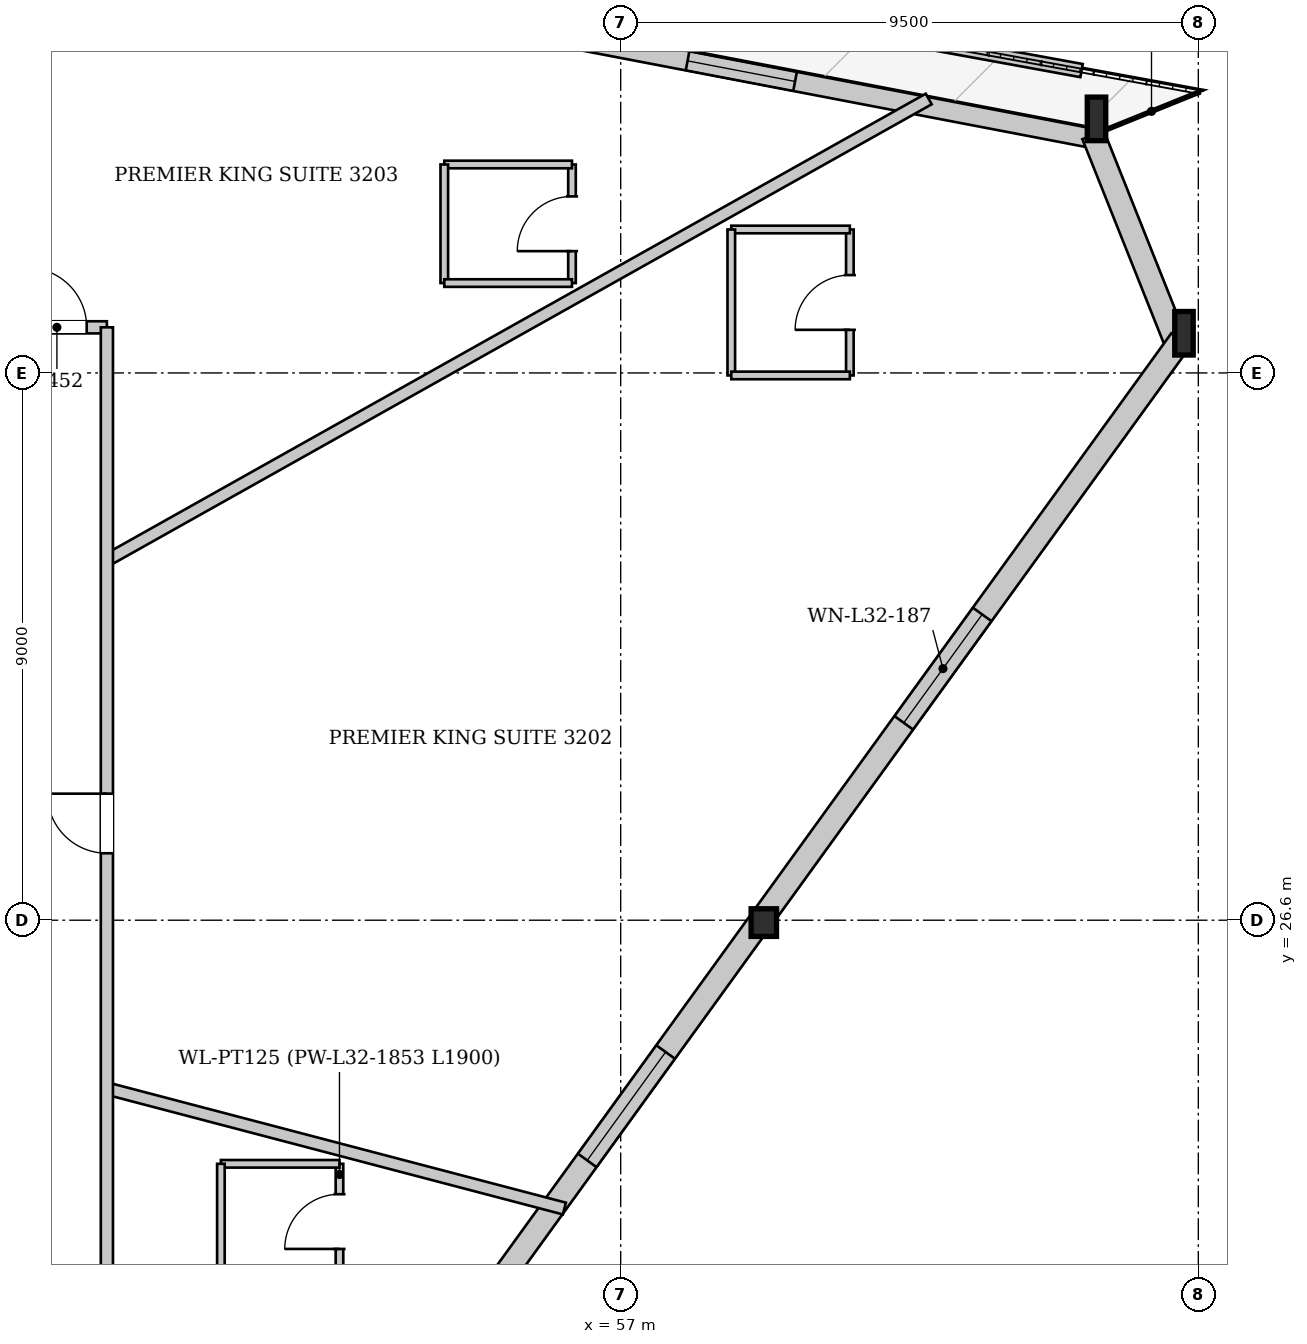
"""IFC4 building model, lengths in metres.
Left out: names, types, materials, properties, quantities, classifications, styles, units other than length and angle.
Written with IfcOpenShell. Run it as: python <this file> out.ifc"""

import sys

from ifc_helpers import new_model, si_unit, direction, frame, frame_2d, origin, origin_2d, place, context, subcontext, project, spatial, rectangle, i_section, extrude, source, transform, mapped, element, fill, save


model = new_model("IFC4")
c1 = context("Model", 3, precision=1e-05, world=origin(), true_north=direction((0.0, 1.0)))
c2 = subcontext(c1, "Body", "Model", "MODEL_VIEW")
j1 = project(units=[si_unit("LENGTHUNIT", "METRE"), si_unit("PLANEANGLEUNIT", "RADIAN")], contexts=[c1])
p1 = place(None, origin())
s1 = spatial("IfcSite", under=j1, at=p1, CompositionType="ELEMENT")
p2 = place(p1, origin())
s2 = spatial("IfcBuilding", under=s1, at=p2, CompositionType="ELEMENT")
p3 = place(p2, frame((0.0, 0.0, 123.45)))
s3 = spatial("IfcBuildingStorey", under=s2, at=p3, CompositionType="ELEMENT", Elevation=123.45)
m1 = source(origin(), c2, "Body", "SweptSolid", [
    extrude(i_section(OverallWidth=0.304, OverallDepth=0.716, WebThickness=0.021, FlangeThickness=0.04, at=origin_2d()), origin(), (0.0, 0.0, 1.0), 3.42),
])
p4 = place(p3, frame((66.364, 36.03, 0.0), z_axis=(-0.058395844812, 0.129927185279, 0.989802430707), x_axis=(-0.912108953762, -0.409947870427, 0.0)))
e1 = element("IfcColumn", 1, at=p4, inside=s3, PredefinedType="COLUMN", context=c2, shape_type="MappedRepresentation", body=[
    mapped(m1, transform((0.0, 0.0, 0.0), x_axis=(1.0, 0.0, 0.0), y_axis=(0.0, 1.0, 0.0), z_axis=(0.0, 0.0, 1.0), scale=1.0)),
])
m2 = source(origin(), c2, "Body", "SweptSolid", [
    extrude(i_section(OverallWidth=0.304, OverallDepth=0.716, WebThickness=0.021, FlangeThickness=0.04, at=origin_2d()), origin(), (0.0, 0.0, 1.0), 3.416),
])
p5 = place(p3, frame((64.946, 39.585, 0.0), z_axis=(-0.07047959591, 0.113153347186, 0.991074642285), x_axis=(-0.848810648346, -0.528696967321, 0.0)))
e2 = element("IfcColumn", 2, at=p5, inside=s3, PredefinedType="COLUMN", context=c2, shape_type="MappedRepresentation", body=[
    mapped(m2, transform((0.0, 0.0, 0.0), x_axis=(1.0, 0.0, 0.0), y_axis=(0.0, 1.0, 0.0), z_axis=(0.0, 0.0, 1.0), scale=1.0)),
])
m3 = source(origin(), c2, "Body", "SweptSolid", [
    extrude(i_section(OverallWidth=0.418, OverallDepth=0.455, WebThickness=0.038, FlangeThickness=0.059, at=origin_2d()), origin(), (0.0, 0.0, 1.0), 3.405),
])
p6 = place(p3, frame((59.382, 26.38, 0.0), z_axis=(-0.01663532253, 0.106480404985, 0.994175633074), x_axis=(-0.988015204801, -0.154356584184, 0.0)))
e3 = element("IfcColumn", 3, at=p6, inside=s3, PredefinedType="COLUMN", context=c2, shape_type="MappedRepresentation", body=[
    mapped(m3, transform((0.0, 0.0, 0.0), x_axis=(1.0, 0.0, 0.0), y_axis=(0.0, 1.0, 0.0), z_axis=(0.0, 0.0, 1.0), scale=1.0)),
])
p7 = place(p3, frame((42.101, 43.794, 0.0), z_axis=(0.0, 0.0, 1.0), x_axis=(0.982169357398, -0.187998280282, 0.0)))
e4 = element("IfcWall", 4, at=p7, inside=s3, PredefinedType="SOLIDWALL", context=c2, shape_type="SweptSolid", body=[
    extrude(rectangle(XDim=23.229, YDim=0.32, at=frame_2d((11.614, 0.0))), origin(), (0.0, 0.0, 1.0), 2.692),
])
p8 = place(p7, frame((6.883, 0.0, 0.0)))
e5 = element("IfcOpeningElement", 5, at=p8, cuts=e4, PredefinedType="OPENING", context=c2, shape_type="SweptSolid", body=[
    extrude(rectangle(XDim=1.1, YDim=2.3, at=frame_2d((0.55, 1.15))), frame((0.0, 0.17, 0.0), z_axis=(0.0, -1.0, 0.0), x_axis=(1.0, 0.0, 0.0)), (0.0, 0.0, 1.0), 0.34),
])
p9 = place(p7, frame((16.289, 0.0, 0.372)))
e6 = element("IfcOpeningElement", 6, at=p9, cuts=e4, PredefinedType="OPENING", context=c2, shape_type="SweptSolid", body=[
    extrude(rectangle(XDim=1.8, YDim=2.2, at=frame_2d((0.9, 1.1))), frame((0.0, 0.17, 0.0), z_axis=(0.0, -1.0, 0.0), x_axis=(1.0, 0.0, 0.0)), (0.0, 0.0, 1.0), 0.34),
])
p10 = place(p3, frame((64.769, 39.514, 0.0), z_axis=(0.0, 0.0, 1.0), x_axis=(0.370565637882, -0.928806281213, 0.0)))
e7 = element("IfcWall", 7, at=p10, inside=s3, PredefinedType="SOLIDWALL", context=c2, shape_type="SweptSolid", body=[
    extrude(rectangle(XDim=3.827, YDim=0.38, at=frame_2d((1.914, 0.0))), origin(), (0.0, 0.0, 1.0), 2.692),
])
p11 = place(p3, frame((66.21, 36.142, 0.0), z_axis=(0.0, 0.0, 1.0), x_axis=(-0.586152279149, -0.810200904497, 0.0)))
e8 = element("IfcWall", 8, at=p11, inside=s3, PredefinedType="SOLIDWALL", context=c2, shape_type="SweptSolid", body=[
    extrude(rectangle(XDim=23.823, YDim=0.38, at=frame_2d((11.911, 0.0))), origin(), (0.0, 0.0, 1.0), 2.692),
])
p12 = place(p11, frame((5.57, 0.0, 0.322)))
e9 = element("IfcOpeningElement", 9, at=p12, cuts=e8, PredefinedType="OPENING", context=c2, shape_type="SweptSolid", body=[
    extrude(rectangle(XDim=2.2, YDim=2.25, at=frame_2d((1.1, 1.125))), frame((0.0, 0.2, 0.0), z_axis=(0.0, -1.0, 0.0), x_axis=(1.0, 0.0, 0.0)), (0.0, 0.0, 1.0), 0.4),
])
p13 = place(p11, frame((14.452, 0.0, 0.322)))
e10 = element("IfcOpeningElement", 10, at=p13, cuts=e8, PredefinedType="OPENING", context=c2, shape_type="SweptSolid", body=[
    extrude(rectangle(XDim=2.2, YDim=2.25, at=frame_2d((1.1, 1.125))), frame((0.0, 0.2, 0.0), z_axis=(0.0, -1.0, 0.0), x_axis=(1.0, 0.0, 0.0)), (0.0, 0.0, 1.0), 0.4),
])
p14 = place(p3, frame((64.58, 40.572, 0.0), z_axis=(0.0, 0.0, 1.0), x_axis=(-0.983755456177, 0.179513794575, 0.0)))
e11 = element("IfcWall", 11, at=p14, inside=s3, PredefinedType="PARAPET", context=c2, shape_type="SweptSolid", body=[
    extrude(rectangle(XDim=20.65, YDim=0.22, at=frame_2d((10.325, 0.0))), origin(), (0.0, 0.0, 1.0), 0.3),
])
p15 = place(p3, frame((48.55, 23.832, 0.0), z_axis=(0.0, 0.0, 1.0), x_axis=(0.967269395898, -0.253751681295, 0.0)))
e12 = element("IfcWall", 12, at=p15, inside=s3, PredefinedType="PARTITIONING", context=c2, shape_type="SweptSolid", body=[
    extrude(rectangle(XDim=7.779, YDim=0.2, at=frame_2d((3.889, 0.0))), origin(), (0.0, 0.0, 1.0), 3.3),
])
p16 = place(p3, frame((48.55, 32.521, 0.0), z_axis=(0.0, 0.0, 1.0), x_axis=(0.872074014934, 0.489374000613, 0.0)))
e13 = element("IfcWall", 13, at=p16, inside=s3, PredefinedType="PARTITIONING", context=c2, shape_type="SweptSolid", body=[
    extrude(rectangle(XDim=15.499, YDim=0.2, at=frame_2d((7.75, 0.0))), origin(), (0.0, 0.0, 1.0), 3.3),
])
p17 = place(p3, frame((52.375, 20.694, 0.0), z_axis=(0.0, 0.0, 1.0), x_axis=(0.0, 1.0, 0.0)))
e14 = element("IfcWall", 14, at=p17, inside=s3, PredefinedType="PARTITIONING", context=c2, shape_type="SweptSolid", body=[
    extrude(rectangle(XDim=1.9, YDim=0.125, at=frame_2d((0.95, 0.0))), origin(), (0.0, 0.0, 1.0), 3.3),
])
p18 = place(p17, frame((0.5, 0.0, 0.0)))
e15 = element("IfcOpeningElement", 15, at=p18, cuts=e14, PredefinedType="OPENING", context=c2, shape_type="SweptSolid", body=[
    extrude(rectangle(XDim=0.9, YDim=2.1, at=frame_2d((0.45, 1.05))), frame((0.0, 0.073, 0.0), z_axis=(0.0, -1.0, 0.0), x_axis=(1.0, 0.0, 0.0)), (0.0, 0.0, 1.0), 0.145),
])
p19 = place(p3, frame((52.375, 22.594, 0.0), z_axis=(0.0, 0.0, 1.0), x_axis=(-1.0, 0.0, 0.0)))
e16 = element("IfcWall", 16, at=p19, inside=s3, PredefinedType="PARTITIONING", context=c2, shape_type="SweptSolid", body=[
    extrude(rectangle(XDim=1.95, YDim=0.125, at=frame_2d((0.975, 0.0))), origin(), (0.0, 0.0, 1.0), 3.3),
])
p20 = place(p3, frame((50.425, 22.594, 0.0), z_axis=(0.0, 0.0, 1.0), x_axis=(0.0, -1.0, 0.0)))
e17 = element("IfcWall", 17, at=p20, inside=s3, PredefinedType="PARTITIONING", context=c2, shape_type="SweptSolid", body=[
    extrude(rectangle(XDim=1.9, YDim=0.125, at=frame_2d((0.95, 0.0))), origin(), (0.0, 0.0, 1.0), 3.3),
])
p21 = place(p3, frame((60.769, 35.559, 0.0), z_axis=(0.0, 0.0, 1.0), x_axis=(0.0, 1.0, 0.0)))
e18 = element("IfcWall", 18, at=p21, inside=s3, PredefinedType="PARTITIONING", context=c2, shape_type="SweptSolid", body=[
    extrude(rectangle(XDim=2.4, YDim=0.125, at=frame_2d((1.2, 0.0))), origin(), (0.0, 0.0, 1.0), 3.3),
])
p22 = place(p21, frame((0.75, 0.0, 0.0)))
e19 = element("IfcOpeningElement", 19, at=p22, cuts=e18, PredefinedType="OPENING", context=c2, shape_type="SweptSolid", body=[
    extrude(rectangle(XDim=0.9, YDim=2.1, at=frame_2d((0.45, 1.05))), frame((0.0, 0.073, 0.0), z_axis=(0.0, -1.0, 0.0), x_axis=(1.0, 0.0, 0.0)), (0.0, 0.0, 1.0), 0.145),
])
p23 = place(p3, frame((60.769, 37.959, 0.0), z_axis=(0.0, 0.0, 1.0), x_axis=(-1.0, 0.0, 0.0)))
e20 = element("IfcWall", 20, at=p23, inside=s3, PredefinedType="PARTITIONING", context=c2, shape_type="SweptSolid", body=[
    extrude(rectangle(XDim=1.95, YDim=0.125, at=frame_2d((0.975, 0.0))), origin(), (0.0, 0.0, 1.0), 2.795),
])
p24 = place(p3, frame((58.819, 37.959, 0.0), z_axis=(0.0, 0.0, 1.0), x_axis=(0.0, -1.0, 0.0)))
e21 = element("IfcWall", 21, at=p24, inside=s3, PredefinedType="PARTITIONING", context=c2, shape_type="SweptSolid", body=[
    extrude(rectangle(XDim=2.4, YDim=0.125, at=frame_2d((1.2, 0.0))), origin(), (0.0, 0.0, 1.0), 3.3),
])
p25 = place(p3, frame((58.819, 35.559, 0.0), z_axis=(0.0, 0.0, 1.0), x_axis=(1.0, 0.0, 0.0)))
e22 = element("IfcWall", 22, at=p25, inside=s3, PredefinedType="PARTITIONING", context=c2, shape_type="SweptSolid", body=[
    extrude(rectangle(XDim=1.95, YDim=0.125, at=frame_2d((0.975, 0.0))), origin(), (0.0, 0.0, 1.0), 3.3),
])
p26 = place(p3, frame((56.199, 37.078, 0.0), z_axis=(0.0, 0.0, 1.0), x_axis=(0.0, 1.0, 0.0)))
e23 = element("IfcWall", 23, at=p26, inside=s3, PredefinedType="PARTITIONING", context=c2, shape_type="SweptSolid", body=[
    extrude(rectangle(XDim=1.95, YDim=0.125, at=frame_2d((0.975, 0.0))), origin(), (0.0, 0.0, 1.0), 3.3),
])
p27 = place(p26, frame((0.525, 0.0, 0.0)))
e24 = element("IfcOpeningElement", 24, at=p27, cuts=e23, PredefinedType="OPENING", context=c2, shape_type="SweptSolid", body=[
    extrude(rectangle(XDim=0.9, YDim=2.1, at=frame_2d((0.45, 1.05))), frame((0.0, 0.073, 0.0), z_axis=(0.0, -1.0, 0.0), x_axis=(1.0, 0.0, 0.0)), (0.0, 0.0, 1.0), 0.145),
])
p28 = place(p3, frame((56.199, 39.028, 0.0), z_axis=(0.0, 0.0, 1.0), x_axis=(-1.0, 0.0, 0.0)))
e25 = element("IfcWall", 25, at=p28, inside=s3, PredefinedType="PARTITIONING", context=c2, shape_type="SweptSolid", body=[
    extrude(rectangle(XDim=2.1, YDim=0.125, at=frame_2d((1.05, 0.0))), origin(), (0.0, 0.0, 1.0), 3.3),
])
p29 = place(p3, frame((54.099, 39.028, 0.0), z_axis=(0.0, 0.0, 1.0), x_axis=(0.0, -1.0, 0.0)))
e26 = element("IfcWall", 26, at=p29, inside=s3, PredefinedType="PARTITIONING", context=c2, shape_type="SweptSolid", body=[
    extrude(rectangle(XDim=1.95, YDim=0.125, at=frame_2d((0.975, 0.0))), origin(), (0.0, 0.0, 1.0), 3.3),
])
p30 = place(p3, frame((54.099, 37.078, 0.0), z_axis=(0.0, 0.0, 1.0), x_axis=(1.0, 0.0, 0.0)))
e27 = element("IfcWall", 27, at=p30, inside=s3, PredefinedType="PARTITIONING", context=c2, shape_type="SweptSolid", body=[
    extrude(rectangle(XDim=2.1, YDim=0.125, at=frame_2d((1.05, 0.0))), origin(), (0.0, 0.0, 1.0), 3.045),
])
p31 = place(p3, frame((27.45, 36.35, 0.0), z_axis=(0.0, 0.0, 1.0), x_axis=(1.0, 0.0, 0.0)))
e28 = element("IfcWall", 28, at=p31, inside=s3, PredefinedType="PARTITIONING", context=c2, shape_type="SweptSolid", body=[
    extrude(rectangle(XDim=21.1, YDim=0.2, at=frame_2d((10.55, 0.0))), origin(), (0.0, 0.0, 1.0), 3.3),
])
p32 = place(p31, frame((19.788, 0.0, 0.0)))
e29 = element("IfcOpeningElement", 29, at=p32, cuts=e28, PredefinedType="OPENING", context=c2, shape_type="SweptSolid", body=[
    extrude(rectangle(XDim=0.98, YDim=2.15, at=frame_2d((0.49, 1.075))), frame((0.0, 0.11, 0.0), z_axis=(0.0, -1.0, 0.0), x_axis=(1.0, 0.0, 0.0)), (0.0, 0.0, 1.0), 0.22),
])
p33 = place(p31, frame((10.147, 0.0, 0.0)))
e30 = element("IfcOpeningElement", 30, at=p33, cuts=e28, PredefinedType="OPENING", context=c2, shape_type="SweptSolid", body=[
    extrude(rectangle(XDim=0.98, YDim=2.15, at=frame_2d((0.49, 1.075))), frame((0.0, 0.11, 0.0), z_axis=(0.0, -1.0, 0.0), x_axis=(1.0, 0.0, 0.0)), (0.0, 0.0, 1.0), 0.22),
])
p34 = place(p31, frame((0.3, 0.0, 0.0)))
e31 = element("IfcOpeningElement", 31, at=p34, cuts=e28, PredefinedType="OPENING", context=c2, shape_type="SweptSolid", body=[
    extrude(rectangle(XDim=0.98, YDim=2.15, at=frame_2d((0.49, 1.075))), frame((0.0, 0.11, 0.0), z_axis=(0.0, -1.0, 0.0), x_axis=(1.0, 0.0, 0.0)), (0.0, 0.0, 1.0), 0.22),
])
p35 = place(p3, frame((48.55, 16.85, 0.0), z_axis=(0.0, 0.0, 1.0), x_axis=(0.0, 1.0, 0.0)))
e32 = element("IfcWall", 32, at=p35, inside=s3, PredefinedType="PARTITIONING", context=c2, shape_type="SweptSolid", body=[
    extrude(rectangle(XDim=19.5, YDim=0.2, at=frame_2d((9.75, 0.0))), origin(), (0.0, 0.0, 1.0), 3.3),
])
p36 = place(p35, frame((10.851, 0.0, 0.0)))
e33 = element("IfcOpeningElement", 33, at=p36, cuts=e32, PredefinedType="OPENING", context=c2, shape_type="SweptSolid", body=[
    extrude(rectangle(XDim=0.98, YDim=2.15, at=frame_2d((0.49, 1.075))), frame((0.0, 0.11, 0.0), z_axis=(0.0, -1.0, 0.0), x_axis=(1.0, 0.0, 0.0)), (0.0, 0.0, 1.0), 0.22),
])
m4 = source(origin(), c2, "Body", "SweptSolid", [
    extrude(rectangle(XDim=1.8, YDim=2.2, at=frame_2d((0.9, 1.1))), frame((0.0, 0.03, 0.0), z_axis=(0.0, -1.0, 0.0), x_axis=(1.0, 0.0, 0.0)), (0.0, 0.0, 1.0), 0.06),
])
p37 = place(p9, origin())
e34 = element("IfcWindow", 34, at=p37, inside=s3, PartitioningType="SINGLE_PANEL", PredefinedType="WINDOW", context=c2, shape_type="MappedRepresentation", body=[
    mapped(m4, transform((0.0, 0.0, 0.0), x_axis=(1.0, 0.0, 0.0), y_axis=(0.0, 1.0, 0.0), z_axis=(0.0, 0.0, 1.0), scale=1.0)),
])
fill(e6, e34)
m5 = source(origin(), c2, "Body", "SweptSolid", [
    extrude(rectangle(XDim=2.2, YDim=2.25, at=frame_2d((1.1, 1.125))), frame((0.0, 0.03, 0.0), z_axis=(0.0, -1.0, 0.0), x_axis=(1.0, 0.0, 0.0)), (0.0, 0.0, 1.0), 0.06),
])
p38 = place(p12, origin())
e35 = element("IfcWindow", 35, at=p38, inside=s3, PartitioningType="SINGLE_PANEL", PredefinedType="WINDOW", context=c2, shape_type="MappedRepresentation", body=[
    mapped(m5, transform((0.0, 0.0, 0.0), x_axis=(1.0, 0.0, 0.0), y_axis=(0.0, 1.0, 0.0), z_axis=(0.0, 0.0, 1.0), scale=1.0)),
])
fill(e9, e35)
p39 = place(p13, origin())
e36 = element("IfcWindow", 36, at=p39, inside=s3, PartitioningType="SINGLE_PANEL", PredefinedType="WINDOW", context=c2, shape_type="MappedRepresentation", body=[
    mapped(m5, transform((0.0, 0.0, 0.0), x_axis=(1.0, 0.0, 0.0), y_axis=(0.0, 1.0, 0.0), z_axis=(0.0, 0.0, 1.0), scale=1.0)),
])
fill(e10, e36)
m6 = source(origin(), c2, "Body", "SweptSolid", [
    extrude(rectangle(XDim=0.9, YDim=2.1, at=frame_2d((0.45, 1.05))), frame((0.0, 0.025, 0.0), z_axis=(0.0, -1.0, 0.0), x_axis=(1.0, 0.0, 0.0)), (0.0, 0.0, 1.0), 0.05),
])
p40 = place(p18, origin())
e37 = element("IfcDoor", 37, at=p40, inside=s3, OperationType="SINGLE_SWING_LEFT", PredefinedType="DOOR", context=c2, shape_type="MappedRepresentation", body=[
    mapped(m6, transform((0.0, 0.0, 0.0), x_axis=(1.0, 0.0, 0.0), y_axis=(0.0, 1.0, 0.0), z_axis=(0.0, 0.0, 1.0), scale=1.0)),
])
fill(e15, e37)
p41 = place(p22, origin())
e38 = element("IfcDoor", 38, at=p41, inside=s3, OperationType="SINGLE_SWING_LEFT", PredefinedType="DOOR", context=c2, shape_type="MappedRepresentation", body=[
    mapped(m6, transform((0.0, 0.0, 0.0), x_axis=(1.0, 0.0, 0.0), y_axis=(0.0, 1.0, 0.0), z_axis=(0.0, 0.0, 1.0), scale=1.0)),
])
fill(e19, e38)
p42 = place(p27, origin())
e39 = element("IfcDoor", 39, at=p42, inside=s3, OperationType="SINGLE_SWING_LEFT", PredefinedType="DOOR", context=c2, shape_type="MappedRepresentation", body=[
    mapped(m6, transform((0.0, 0.0, 0.0), x_axis=(1.0, 0.0, 0.0), y_axis=(0.0, 1.0, 0.0), z_axis=(0.0, 0.0, 1.0), scale=1.0)),
])
fill(e24, e39)
m7 = source(origin(), c2, "Body", "SweptSolid", [
    extrude(rectangle(XDim=0.98, YDim=2.15, at=frame_2d((0.49, 1.075))), frame((0.0, 0.025, 0.0), z_axis=(0.0, -1.0, 0.0), x_axis=(1.0, 0.0, 0.0)), (0.0, 0.0, 1.0), 0.05),
])
p43 = place(p32, origin())
e40 = element("IfcDoor", 40, at=p43, inside=s3, OperationType="SINGLE_SWING_LEFT", PredefinedType="DOOR", context=c2, shape_type="MappedRepresentation", body=[
    mapped(m7, transform((0.0, 0.0, 0.0), x_axis=(1.0, 0.0, 0.0), y_axis=(0.0, 1.0, 0.0), z_axis=(0.0, 0.0, 1.0), scale=1.0)),
])
fill(e29, e40)
p44 = place(p36, origin())
e41 = element("IfcDoor", 41, at=p44, inside=s3, OperationType="SINGLE_SWING_RIGHT", PredefinedType="DOOR", context=c2, shape_type="MappedRepresentation", body=[
    mapped(m7, transform((0.0, 0.0, 0.0), x_axis=(1.0, 0.0, 0.0), y_axis=(0.0, 1.0, 0.0), z_axis=(0.0, 0.0, 1.0), scale=1.0)),
])
fill(e33, e41)
save(model, sys.argv[1])
